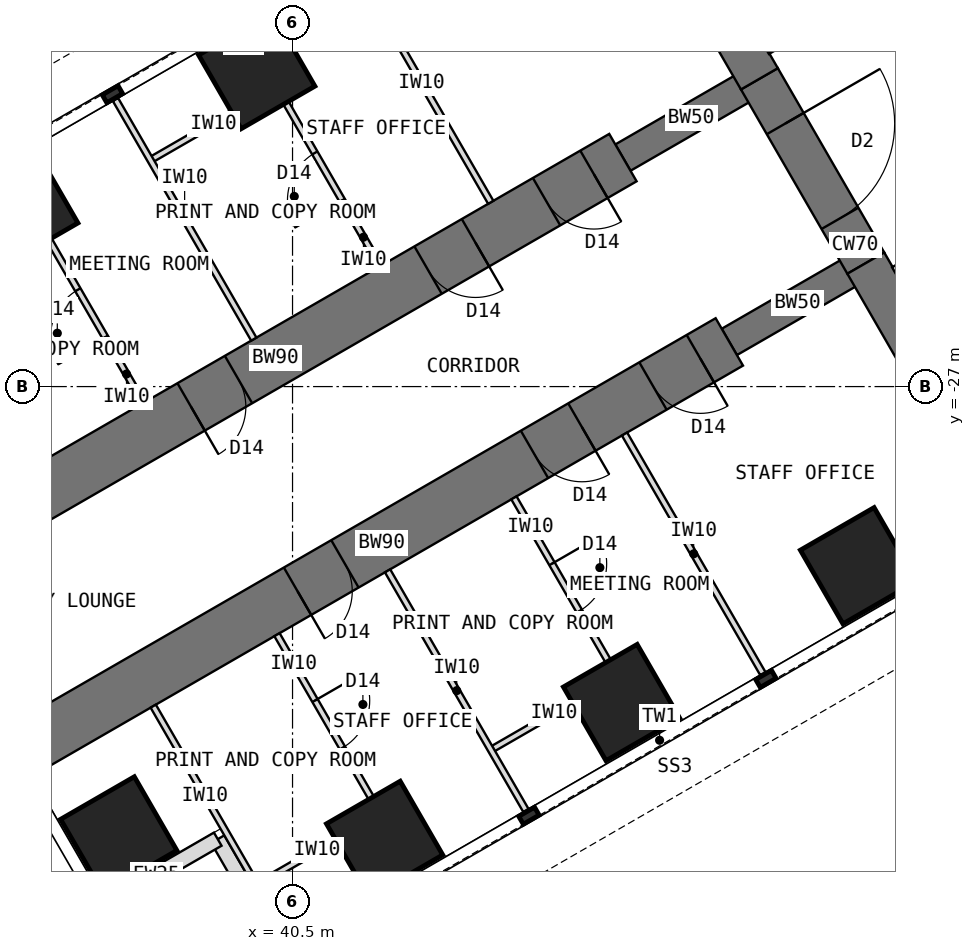
"""IFC4 building model, lengths in metres.
Left out: names, types, materials, properties, quantities, classifications, styles, units other than length and angle.
Written with IfcOpenShell. Run it as: python <this file> out.ifc"""

import sys

from ifc_helpers import new_model, si_unit, direction, frame, frame_2d, origin, origin_2d, place, context, subcontext, project, spatial, rectangle, extrude, element, fill, save


model = new_model("IFC4")
c1 = context("Model", 3, precision=1e-05, world=origin(), true_north=direction((0.0, 1.0)))
c2 = subcontext(c1, "Body", "Model", "MODEL_VIEW")
j1 = project(units=[si_unit("LENGTHUNIT", "METRE"), si_unit("PLANEANGLEUNIT", "RADIAN")], contexts=[c1])
p1 = place(None, origin())
s1 = spatial("IfcSite", under=j1, at=p1, CompositionType="ELEMENT")
p2 = place(p1, origin())
s2 = spatial("IfcBuilding", under=s1, at=p2, CompositionType="ELEMENT")
p3 = place(p2, frame((0.0, 0.0, 84.5)))
s3 = spatial("IfcBuildingStorey", under=s2, at=p3, CompositionType="ELEMENT", Elevation=84.5)
p4 = place(p3, frame((45.904, -18.0, 0.0), z_axis=(0.0, 0.0, 1.0), x_axis=(0.500024481964, -0.866011268655, 0.0)))
e1 = element("IfcWall", 1, at=p4, inside=s3, PredefinedType="SHEAR", context=c2, shape_type="SweptSolid", body=[
    extrude(rectangle(XDim=4.548, YDim=0.7, at=frame_2d((2.274, 0.0))), origin(), (0.0, 0.0, 1.0), 4.0),
])
p5 = place(p3, frame((48.178, -21.939, 0.0), z_axis=(0.0, 0.0, 1.0), x_axis=(0.500010275428, -0.866019471182, 0.0)))
e2 = element("IfcWall", 2, at=p5, inside=s3, PredefinedType="SHEAR", context=c2, shape_type="SweptSolid", body=[
    extrude(rectangle(XDim=3.5, YDim=0.7, at=frame_2d((1.75, 0.0))), origin(), (0.0, 0.0, 1.0), 4.0),
])
p6 = place(p5, frame((0.85, 0.0, 0.0)))
e3 = element("IfcOpeningElement", 3, at=p6, cuts=e2, PredefinedType="OPENING", context=c2, shape_type="SweptSolid", body=[
    extrude(rectangle(XDim=1.8, YDim=2.1, at=frame_2d((0.9, 1.05))), frame((0.0, 0.36, 0.0), z_axis=(0.0, -1.0, 0.0), x_axis=(1.0, 0.0, 0.0)), (0.0, 0.0, 1.0), 0.72),
])
p7 = place(p3, frame((49.928, -24.97, 0.0), z_axis=(0.0, 0.0, 1.0), x_axis=(0.499984222037, -0.866034513004, 0.0)))
e4 = element("IfcWall", 4, at=p7, inside=s3, PredefinedType="SHEAR", context=c2, shape_type="SweptSolid", body=[
    extrude(rectangle(XDim=4.548, YDim=0.7, at=frame_2d((2.274, 0.0))), origin(), (0.0, 0.0, 1.0), 4.0),
])
p8 = place(p3, frame((49.928, -24.97, 0.0), z_axis=(0.0, 0.0, 1.0), x_axis=(-0.866031863473, -0.499988811324, 0.0)))
e5 = element("IfcWall", 5, at=p8, inside=s3, PredefinedType="SHEAR", context=c2, shape_type="SweptSolid", body=[
    extrude(rectangle(XDim=2.592, YDim=0.5, at=frame_2d((1.296, 0.0))), origin(), (0.0, 0.0, 1.0), 4.0),
])
p9 = place(p3, frame((47.684, -26.266, 0.0), z_axis=(0.0, 0.0, 1.0), x_axis=(-0.866027579429, -0.499996231654, 0.0)))
e6 = element("IfcWall", 6, at=p9, inside=s3, PredefinedType="SHEAR", context=c2, shape_type="SweptSolid", body=[
    extrude(rectangle(XDim=13.2, YDim=0.9, at=frame_2d((6.6, 0.0))), origin(), (0.0, 0.0, 1.0), 4.0),
])
p10 = place(p9, frame((0.55, 0.0, 0.0)))
e7 = element("IfcOpeningElement", 7, at=p10, cuts=e6, PredefinedType="OPENING", context=c2, shape_type="SweptSolid", body=[
    extrude(rectangle(XDim=0.9, YDim=2.1, at=frame_2d((0.45, 1.05))), frame((0.0, 0.46, 0.0), z_axis=(0.0, -1.0, 0.0), x_axis=(1.0, 0.0, 0.0)), (0.0, 0.0, 1.0), 0.92),
])
p11 = place(p9, frame((2.8, 0.0, 0.0)))
e8 = element("IfcOpeningElement", 8, at=p11, cuts=e6, PredefinedType="OPENING", context=c2, shape_type="SweptSolid", body=[
    extrude(rectangle(XDim=0.9, YDim=2.1, at=frame_2d((0.45, 1.05))), frame((0.0, 0.46, 0.0), z_axis=(0.0, -1.0, 0.0), x_axis=(1.0, 0.0, 0.0)), (0.0, 0.0, 1.0), 0.92),
])
p12 = place(p9, frame((7.3, 0.0, 0.0)))
e9 = element("IfcOpeningElement", 9, at=p12, cuts=e6, PredefinedType="OPENING", context=c2, shape_type="SweptSolid", body=[
    extrude(rectangle(XDim=0.9, YDim=2.1, at=frame_2d((0.45, 1.05))), frame((0.0, 0.46, 0.0), z_axis=(0.0, -1.0, 0.0), x_axis=(1.0, 0.0, 0.0)), (0.0, 0.0, 1.0), 0.92),
])
p13 = place(p3, frame((48.178, -21.939, 0.0), z_axis=(0.0, 0.0, 1.0), x_axis=(-0.866072649678, -0.499918158782, 0.0)))
e10 = element("IfcWall", 10, at=p13, inside=s3, PredefinedType="SHEAR", context=c2, shape_type="SweptSolid", body=[
    extrude(rectangle(XDim=2.592, YDim=0.5, at=frame_2d((1.296, 0.0))), origin(), (0.0, 0.0, 1.0), 4.0),
])
p14 = place(p3, frame((45.934, -23.234, 0.0), z_axis=(0.0, 0.0, 1.0), x_axis=(-0.866019570528, -0.500010103361, 0.0)))
e11 = element("IfcWall", 11, at=p14, inside=s3, PredefinedType="SHEAR", context=c2, shape_type="SweptSolid", body=[
    extrude(rectangle(XDim=13.2, YDim=0.9, at=frame_2d((6.6, 0.0))), origin(), (0.0, 0.0, 1.0), 4.0),
])
p15 = place(p14, frame((0.55, 0.0, 0.0)))
e12 = element("IfcOpeningElement", 12, at=p15, cuts=e11, PredefinedType="OPENING", context=c2, shape_type="SweptSolid", body=[
    extrude(rectangle(XDim=0.9, YDim=2.1, at=frame_2d((0.45, 1.05))), frame((0.0, 0.46, 0.0), z_axis=(0.0, -1.0, 0.0), x_axis=(1.0, 0.0, 0.0)), (0.0, 0.0, 1.0), 0.92),
])
p16 = place(p14, frame((2.8, 0.0, 0.0)))
e13 = element("IfcOpeningElement", 13, at=p16, cuts=e11, PredefinedType="OPENING", context=c2, shape_type="SweptSolid", body=[
    extrude(rectangle(XDim=0.9, YDim=2.1, at=frame_2d((0.45, 1.05))), frame((0.0, 0.46, 0.0), z_axis=(0.0, -1.0, 0.0), x_axis=(1.0, 0.0, 0.0)), (0.0, 0.0, 1.0), 0.92),
])
p17 = place(p14, frame((7.3, 0.0, 0.0)))
e14 = element("IfcOpeningElement", 14, at=p17, cuts=e11, PredefinedType="OPENING", context=c2, shape_type="SweptSolid", body=[
    extrude(rectangle(XDim=0.9, YDim=2.1, at=frame_2d((0.45, 1.05))), frame((0.0, 0.46, 0.0), z_axis=(0.0, -1.0, 0.0), x_axis=(1.0, 0.0, 0.0)), (0.0, 0.0, 1.0), 0.92),
])
for number, where, z_axis, x_axis in (
    (15, (49.809, -29.946, 0.0), (0.0, 0.0, 1.0), (0.866, 0.5, 0.0)),
    (16, (45.912, -32.196, 0.0), (0.0, 0.0, 1.0), (0.866, 0.5, 0.0)),
    (17, (39.912, -21.804, 0.0), (0.0, 0.0, 1.0), (0.866, 0.5, 0.0)),
    (18, (42.014, -34.446, 0.0), (0.0, 0.0, 1.0), (0.866, 0.5, 0.0)),
    (19, (36.014, -24.054, 0.0), (0.0, 0.0, 1.0), (0.866, 0.5, 0.0)),
    (20, (37.642, -34.373, 0.0), (0.0, 0.0, 1.0), (0.866, 0.5, 0.0)),
):
    element("IfcColumn", number, at=place(p3, frame(where, z_axis=z_axis, x_axis=x_axis)), inside=s3, PredefinedType="COLUMN", context=c2, shape_type="SweptSolid", body=[
        extrude(rectangle(XDim=1.4, YDim=1.4, at=origin_2d()), origin(), (0.0, 0.0, 1.0), 4.0),
    ])
for number, where, z_axis, x_axis in (
    (21, (40.433, -36.456, 0.0), (0.0, 0.0, 1.0), (-0.5, 0.866, 0.0)),
    (22, (39.27, -34.443, 0.0), (0.0, 0.0, 1.0), (-0.866, -0.5, 0.0)),
):
    element("IfcWall", number, at=place(p3, frame(where, z_axis=z_axis, x_axis=x_axis)), inside=s3, PredefinedType="STANDARD", context=c2, shape_type="SweptSolid", body=[
        extrude(rectangle(XDim=2.325, YDim=0.25, at=frame_2d((1.163, 0.0))), origin(), (0.0, 0.0, 1.0), 3.8),
    ])
for number, where, z_axis, x_axis in (
    (23, (45.96, -27.78, 0.0), (0.0, 0.0, 1.0), (0.5, -0.866, 0.0)),
    (24, (42.063, -30.03, 0.0), (0.0, 0.0, 1.0), (0.5, -0.866, 0.0)),
):
    element("IfcWall", number, at=place(p3, frame(where, z_axis=z_axis, x_axis=x_axis)), inside=s3, PredefinedType="PARTITIONING", context=c2, shape_type="SweptSolid", body=[
        extrude(rectangle(XDim=4.55, YDim=0.1, at=frame_2d((2.275, 0.0))), origin(), (0.0, 0.0, 1.0), 3.8),
    ])
p18 = place(p3, frame((45.842, -31.775, 0.0), z_axis=(0.0, 0.0, 1.0), x_axis=(-0.866006032174, -0.500033551112, 0.0)))
e25 = element("IfcWall", 25, at=p18, inside=s3, PredefinedType="PARTITIONING", context=c2, shape_type="SweptSolid", body=[
    extrude(rectangle(XDim=2.4, YDim=0.1, at=frame_2d((1.2, 0.0))), origin(), (0.0, 0.0, 1.0), 3.8),
])
p19 = place(p3, frame((44.141, -28.83, 0.0), z_axis=(0.0, 0.0, 1.0), x_axis=(0.500062241894, -0.865989465428, 0.0)))
e26 = element("IfcWall", 26, at=p19, inside=s3, PredefinedType="PARTITIONING", context=c2, shape_type="SweptSolid", body=[
    extrude(rectangle(XDim=3.4, YDim=0.1, at=frame_2d((1.7, 0.0))), origin(), (0.0, 0.0, 1.0), 3.8),
])
p20 = place(p19, frame((1.25, 0.0, 0.0)))
e27 = element("IfcOpeningElement", 27, at=p20, cuts=e26, PredefinedType="OPENING", context=c2, shape_type="SweptSolid", body=[
    extrude(rectangle(XDim=0.9, YDim=2.1, at=frame_2d((0.45, 1.05))), frame((0.0, 0.06, 0.0), z_axis=(0.0, -1.0, 0.0), x_axis=(1.0, 0.0, 0.0)), (0.0, 0.0, 1.0), 0.12),
])
p21 = place(p3, frame((41.944, -34.025, 0.0), z_axis=(0.0, 0.0, 1.0), x_axis=(-0.865980596518, -0.500077600433, 0.0)))
e28 = element("IfcWall", 28, at=p21, inside=s3, PredefinedType="PARTITIONING", context=c2, shape_type="SweptSolid", body=[
    extrude(rectangle(XDim=2.4, YDim=0.1, at=frame_2d((1.2, 0.0))), origin(), (0.0, 0.0, 1.0), 3.8),
])
p22 = place(p3, frame((40.244, -31.08, 0.0), z_axis=(0.0, 0.0, 1.0), x_axis=(0.500008388397, -0.866020560687, 0.0)))
e29 = element("IfcWall", 29, at=p22, inside=s3, PredefinedType="PARTITIONING", context=c2, shape_type="SweptSolid", body=[
    extrude(rectangle(XDim=3.4, YDim=0.1, at=frame_2d((1.7, 0.0))), origin(), (0.0, 0.0, 1.0), 3.8),
])
p23 = place(p22, frame((1.25, 0.0, 0.0)))
e30 = element("IfcOpeningElement", 30, at=p23, cuts=e29, PredefinedType="OPENING", context=c2, shape_type="SweptSolid", body=[
    extrude(rectangle(XDim=0.9, YDim=2.1, at=frame_2d((0.45, 1.05))), frame((0.0, 0.06, 0.0), z_axis=(0.0, -1.0, 0.0), x_axis=(1.0, 0.0, 0.0)), (0.0, 0.0, 1.0), 0.12),
])
p24 = place(p3, frame((38.209, -32.255, 0.0), z_axis=(0.0, 0.0, 1.0), x_axis=(0.500008388397, -0.866020560687, 0.0)))
e31 = element("IfcWall", 31, at=p24, inside=s3, PredefinedType="PARTITIONING", context=c2, shape_type="SweptSolid", body=[
    extrude(rectangle(XDim=3.4, YDim=0.1, at=frame_2d((1.7, 0.0))), origin(), (0.0, 0.0, 1.0), 3.8),
])
for number, where, z_axis, x_axis in (
    (32, (43.76, -23.97, 0.0), (0.0, 0.0, 1.0), (-0.5, 0.866, 0.0)),
    (33, (39.863, -26.22, 0.0), (0.0, 0.0, 1.0), (-0.5, 0.866, 0.0)),
):
    element("IfcWall", number, at=place(p3, frame(where, z_axis=z_axis, x_axis=x_axis)), inside=s3, PredefinedType="PARTITIONING", context=c2, shape_type="SweptSolid", body=[
        extrude(rectangle(XDim=4.55, YDim=0.1, at=frame_2d((2.275, 0.0))), origin(), (0.0, 0.0, 1.0), 3.8),
    ])
p25 = place(p3, frame((40.241, -22.075, 0.0), z_axis=(0.0, 0.0, 1.0), x_axis=(-0.866024647952, -0.500001309137, 0.0)))
e34 = element("IfcWall", 34, at=p25, inside=s3, PredefinedType="PARTITIONING", context=c2, shape_type="SweptSolid", body=[
    extrude(rectangle(XDim=2.4, YDim=0.1, at=frame_2d((1.2, 0.0))), origin(), (0.0, 0.0, 1.0), 3.8),
])
p26 = place(p3, frame((41.941, -25.02, 0.0), z_axis=(0.0, 0.0, 1.0), x_axis=(-0.499977295307, 0.866038511948, 0.0)))
e35 = element("IfcWall", 35, at=p26, inside=s3, PredefinedType="PARTITIONING", context=c2, shape_type="SweptSolid", body=[
    extrude(rectangle(XDim=3.4, YDim=0.1, at=frame_2d((1.7, 0.0))), origin(), (0.0, 0.0, 1.0), 3.8),
])
p27 = place(p26, frame((1.25, 0.0, 0.0)))
e36 = element("IfcOpeningElement", 36, at=p27, cuts=e35, PredefinedType="OPENING", context=c2, shape_type="SweptSolid", body=[
    extrude(rectangle(XDim=0.9, YDim=2.1, at=frame_2d((0.45, 1.05))), frame((0.0, 0.06, 0.0), z_axis=(0.0, -1.0, 0.0), x_axis=(1.0, 0.0, 0.0)), (0.0, 0.0, 1.0), 0.12),
])
p28 = place(p3, frame((38.044, -27.27, 0.0), z_axis=(0.0, 0.0, 1.0), x_axis=(-0.500031147688, 0.866007419912, 0.0)))
e37 = element("IfcWall", 37, at=p28, inside=s3, PredefinedType="PARTITIONING", context=c2, shape_type="SweptSolid", body=[
    extrude(rectangle(XDim=3.4, YDim=0.1, at=frame_2d((1.7, 0.0))), origin(), (0.0, 0.0, 1.0), 3.8),
])
p29 = place(p28, frame((1.25, 0.0, 0.0)))
e38 = element("IfcOpeningElement", 38, at=p29, cuts=e37, PredefinedType="OPENING", context=c2, shape_type="SweptSolid", body=[
    extrude(rectangle(XDim=0.9, YDim=2.1, at=frame_2d((0.45, 1.05))), frame((0.0, 0.06, 0.0), z_axis=(0.0, -1.0, 0.0), x_axis=(1.0, 0.0, 0.0)), (0.0, 0.0, 1.0), 0.12),
])
p30 = place(p3, frame((48.298, -21.466, 0.0), z_axis=(0.0, 0.0, 1.0), x_axis=(0.866021148949, 0.500007369519, 0.0)))
e39 = element("IfcWall", 39, at=p30, inside=s3, PredefinedType="PARTITIONING", context=c2, shape_type="SweptSolid", body=[
    extrude(rectangle(XDim=4.426, YDim=0.15, at=frame_2d((2.213, 0.0))), origin(), (0.0, 0.0, 1.0), 3.8),
])
p31 = place(p30, frame((2.598, 0.0, 0.0)))
e40 = element("IfcOpeningElement", 40, at=p31, cuts=e39, PredefinedType="OPENING", context=c2, shape_type="SweptSolid", body=[
    extrude(rectangle(XDim=1.0, YDim=2.1, at=frame_2d((0.5, 1.05))), frame((0.0, 0.085, 0.0), z_axis=(0.0, -1.0, 0.0), x_axis=(1.0, 0.0, 0.0)), (0.0, 0.0, 1.0), 0.17),
])
p32 = place(p3, frame((54.23, -22.89, 0.0), z_axis=(0.0, 0.0, 1.0), x_axis=(-0.866021148949, -0.500007369519, 0.0)))
e41 = element("IfcWall", 41, at=p32, inside=s3, PredefinedType="PARTITIONING", context=c2, shape_type="SweptSolid", body=[
    extrude(rectangle(XDim=4.426, YDim=0.15, at=frame_2d((2.213, 0.0))), origin(), (0.0, 0.0, 1.0), 3.8),
])
p33 = place(p32, frame((0.828, 0.0, 0.0)))
e42 = element("IfcOpeningElement", 42, at=p33, cuts=e41, PredefinedType="OPENING", context=c2, shape_type="SweptSolid", body=[
    extrude(rectangle(XDim=1.0, YDim=2.1, at=frame_2d((0.5, 1.05))), frame((0.0, 0.085, 0.0), z_axis=(0.0, -1.0, 0.0), x_axis=(1.0, 0.0, 0.0)), (0.0, 0.0, 1.0), 0.17),
])
p34 = place(p6, origin())
e43 = element("IfcDoor", 43, at=p34, inside=s3, OperationType="DOUBLE_DOOR_DOUBLE_SWING", PredefinedType="DOOR", context=c2, shape_type="SweptSolid", body=[
    extrude(rectangle(XDim=1.72, YDim=2.06, at=frame_2d((0.9, 1.03))), frame((0.0, 0.025, 0.0), z_axis=(0.0, -1.0, 0.0), x_axis=(1.0, 0.0, 0.0)), (0.0, 0.0, 1.0), 0.05),
    extrude(rectangle(XDim=0.04, YDim=2.1, at=frame_2d((0.02, 1.05))), frame((0.0, 0.35, 0.0), z_axis=(0.0, -1.0, 0.0), x_axis=(1.0, 0.0, 0.0)), (0.0, 0.0, 1.0), 0.699),
    extrude(rectangle(XDim=0.04, YDim=2.1, at=frame_2d((1.78, 1.05))), frame((0.0, 0.35, 0.0), z_axis=(0.0, -1.0, 0.0), x_axis=(1.0, 0.0, 0.0)), (0.0, 0.0, 1.0), 0.699),
    extrude(rectangle(XDim=1.72, YDim=0.04, at=frame_2d((0.9, 2.08))), frame((0.0, 0.35, 0.0), z_axis=(0.0, -1.0, 0.0), x_axis=(1.0, 0.0, 0.0)), (0.0, 0.0, 1.0), 0.699),
])
fill(e3, e43)
p35 = place(p20, origin())
e44 = element("IfcDoor", 44, at=p35, inside=s3, OperationType="SINGLE_SWING_LEFT", PredefinedType="DOOR", context=c2, shape_type="SweptSolid", body=[
    extrude(rectangle(XDim=0.9, YDim=2.1, at=frame_2d((0.45, 1.05))), frame((0.0, 0.025, 0.0), z_axis=(0.0, -1.0, 0.0), x_axis=(1.0, 0.0, 0.0)), (0.0, 0.0, 1.0), 0.05),
])
fill(e27, e44)
p36 = place(p23, origin())
e45 = element("IfcDoor", 45, at=p36, inside=s3, OperationType="SINGLE_SWING_LEFT", PredefinedType="DOOR", context=c2, shape_type="SweptSolid", body=[
    extrude(rectangle(XDim=0.9, YDim=2.1, at=frame_2d((0.45, 1.05))), frame((0.0, 0.025, 0.0), z_axis=(0.0, -1.0, 0.0), x_axis=(1.0, 0.0, 0.0)), (0.0, 0.0, 1.0), 0.05),
])
fill(e30, e45)
p37 = place(p27, origin())
e46 = element("IfcDoor", 46, at=p37, inside=s3, OperationType="SINGLE_SWING_LEFT", PredefinedType="DOOR", context=c2, shape_type="SweptSolid", body=[
    extrude(rectangle(XDim=0.9, YDim=2.1, at=frame_2d((0.45, 1.05))), frame((0.0, 0.025, 0.0), z_axis=(0.0, -1.0, 0.0), x_axis=(1.0, 0.0, 0.0)), (0.0, 0.0, 1.0), 0.05),
])
fill(e36, e46)
p38 = place(p29, origin())
e47 = element("IfcDoor", 47, at=p38, inside=s3, OperationType="SINGLE_SWING_LEFT", PredefinedType="DOOR", context=c2, shape_type="SweptSolid", body=[
    extrude(rectangle(XDim=0.9, YDim=2.1, at=frame_2d((0.45, 1.05))), frame((0.0, 0.025, 0.0), z_axis=(0.0, -1.0, 0.0), x_axis=(1.0, 0.0, 0.0)), (0.0, 0.0, 1.0), 0.05),
])
fill(e38, e47)
p39 = place(p10, origin())
e48 = element("IfcDoor", 48, at=p39, inside=s3, OperationType="SINGLE_SWING_LEFT", PredefinedType="DOOR", context=c2, shape_type="SweptSolid", body=[
    extrude(rectangle(XDim=0.82, YDim=2.06, at=frame_2d((0.45, 1.03))), frame((0.0, 0.025, 0.0), z_axis=(0.0, -1.0, 0.0), x_axis=(1.0, 0.0, 0.0)), (0.0, 0.0, 1.0), 0.05),
    extrude(rectangle(XDim=0.04, YDim=2.1, at=frame_2d((0.02, 1.05))), frame((0.0, 0.45, 0.0), z_axis=(0.0, -1.0, 0.0), x_axis=(1.0, 0.0, 0.0)), (0.0, 0.0, 1.0), 0.899),
    extrude(rectangle(XDim=0.04, YDim=2.1, at=frame_2d((0.88, 1.05))), frame((0.0, 0.45, 0.0), z_axis=(0.0, -1.0, 0.0), x_axis=(1.0, 0.0, 0.0)), (0.0, 0.0, 1.0), 0.899),
    extrude(rectangle(XDim=0.82, YDim=0.04, at=frame_2d((0.45, 2.08))), frame((0.0, 0.45, 0.0), z_axis=(0.0, -1.0, 0.0), x_axis=(1.0, 0.0, 0.0)), (0.0, 0.0, 1.0), 0.899),
])
fill(e7, e48)
p40 = place(p11, origin())
e49 = element("IfcDoor", 49, at=p40, inside=s3, OperationType="SINGLE_SWING_LEFT", PredefinedType="DOOR", context=c2, shape_type="SweptSolid", body=[
    extrude(rectangle(XDim=0.82, YDim=2.06, at=frame_2d((0.45, 1.03))), frame((0.0, 0.025, 0.0), z_axis=(0.0, -1.0, 0.0), x_axis=(1.0, 0.0, 0.0)), (0.0, 0.0, 1.0), 0.05),
    extrude(rectangle(XDim=0.04, YDim=2.1, at=frame_2d((0.02, 1.05))), frame((0.0, 0.45, 0.0), z_axis=(0.0, -1.0, 0.0), x_axis=(1.0, 0.0, 0.0)), (0.0, 0.0, 1.0), 0.899),
    extrude(rectangle(XDim=0.04, YDim=2.1, at=frame_2d((0.88, 1.05))), frame((0.0, 0.45, 0.0), z_axis=(0.0, -1.0, 0.0), x_axis=(1.0, 0.0, 0.0)), (0.0, 0.0, 1.0), 0.899),
    extrude(rectangle(XDim=0.82, YDim=0.04, at=frame_2d((0.45, 2.08))), frame((0.0, 0.45, 0.0), z_axis=(0.0, -1.0, 0.0), x_axis=(1.0, 0.0, 0.0)), (0.0, 0.0, 1.0), 0.899),
])
fill(e8, e49)
p41 = place(p12, origin())
e50 = element("IfcDoor", 50, at=p41, inside=s3, OperationType="SINGLE_SWING_RIGHT", PredefinedType="DOOR", context=c2, shape_type="SweptSolid", body=[
    extrude(rectangle(XDim=0.82, YDim=2.06, at=frame_2d((0.45, 1.03))), frame((0.0, 0.025, 0.0), z_axis=(0.0, -1.0, 0.0), x_axis=(1.0, 0.0, 0.0)), (0.0, 0.0, 1.0), 0.05),
    extrude(rectangle(XDim=0.04, YDim=2.1, at=frame_2d((0.02, 1.05))), frame((0.0, 0.45, 0.0), z_axis=(0.0, -1.0, 0.0), x_axis=(1.0, 0.0, 0.0)), (0.0, 0.0, 1.0), 0.899),
    extrude(rectangle(XDim=0.04, YDim=2.1, at=frame_2d((0.88, 1.05))), frame((0.0, 0.45, 0.0), z_axis=(0.0, -1.0, 0.0), x_axis=(1.0, 0.0, 0.0)), (0.0, 0.0, 1.0), 0.899),
    extrude(rectangle(XDim=0.82, YDim=0.04, at=frame_2d((0.45, 2.08))), frame((0.0, 0.45, 0.0), z_axis=(0.0, -1.0, 0.0), x_axis=(1.0, 0.0, 0.0)), (0.0, 0.0, 1.0), 0.899),
])
fill(e9, e50)
p42 = place(p15, origin())
e51 = element("IfcDoor", 51, at=p42, inside=s3, OperationType="SINGLE_SWING_LEFT", PredefinedType="DOOR", context=c2, shape_type="SweptSolid", body=[
    extrude(rectangle(XDim=0.82, YDim=2.06, at=frame_2d((0.45, 1.03))), frame((0.0, 0.025, 0.0), z_axis=(0.0, -1.0, 0.0), x_axis=(1.0, 0.0, 0.0)), (0.0, 0.0, 1.0), 0.05),
    extrude(rectangle(XDim=0.04, YDim=2.1, at=frame_2d((0.02, 1.05))), frame((0.0, 0.45, 0.0), z_axis=(0.0, -1.0, 0.0), x_axis=(1.0, 0.0, 0.0)), (0.0, 0.0, 1.0), 0.899),
    extrude(rectangle(XDim=0.04, YDim=2.1, at=frame_2d((0.88, 1.05))), frame((0.0, 0.45, 0.0), z_axis=(0.0, -1.0, 0.0), x_axis=(1.0, 0.0, 0.0)), (0.0, 0.0, 1.0), 0.899),
    extrude(rectangle(XDim=0.82, YDim=0.04, at=frame_2d((0.45, 2.08))), frame((0.0, 0.45, 0.0), z_axis=(0.0, -1.0, 0.0), x_axis=(1.0, 0.0, 0.0)), (0.0, 0.0, 1.0), 0.899),
])
fill(e12, e51)
p43 = place(p16, origin())
e52 = element("IfcDoor", 52, at=p43, inside=s3, OperationType="SINGLE_SWING_LEFT", PredefinedType="DOOR", context=c2, shape_type="SweptSolid", body=[
    extrude(rectangle(XDim=0.82, YDim=2.06, at=frame_2d((0.45, 1.03))), frame((0.0, 0.025, 0.0), z_axis=(0.0, -1.0, 0.0), x_axis=(1.0, 0.0, 0.0)), (0.0, 0.0, 1.0), 0.05),
    extrude(rectangle(XDim=0.04, YDim=2.1, at=frame_2d((0.02, 1.05))), frame((0.0, 0.45, 0.0), z_axis=(0.0, -1.0, 0.0), x_axis=(1.0, 0.0, 0.0)), (0.0, 0.0, 1.0), 0.899),
    extrude(rectangle(XDim=0.04, YDim=2.1, at=frame_2d((0.88, 1.05))), frame((0.0, 0.45, 0.0), z_axis=(0.0, -1.0, 0.0), x_axis=(1.0, 0.0, 0.0)), (0.0, 0.0, 1.0), 0.899),
    extrude(rectangle(XDim=0.82, YDim=0.04, at=frame_2d((0.45, 2.08))), frame((0.0, 0.45, 0.0), z_axis=(0.0, -1.0, 0.0), x_axis=(1.0, 0.0, 0.0)), (0.0, 0.0, 1.0), 0.899),
])
fill(e13, e52)
p44 = place(p17, origin())
e53 = element("IfcDoor", 53, at=p44, inside=s3, OperationType="SINGLE_SWING_RIGHT", PredefinedType="DOOR", context=c2, shape_type="SweptSolid", body=[
    extrude(rectangle(XDim=0.82, YDim=2.06, at=frame_2d((0.45, 1.03))), frame((0.0, 0.025, 0.0), z_axis=(0.0, -1.0, 0.0), x_axis=(1.0, 0.0, 0.0)), (0.0, 0.0, 1.0), 0.05),
    extrude(rectangle(XDim=0.04, YDim=2.1, at=frame_2d((0.02, 1.05))), frame((0.0, 0.45, 0.0), z_axis=(0.0, -1.0, 0.0), x_axis=(1.0, 0.0, 0.0)), (0.0, 0.0, 1.0), 0.899),
    extrude(rectangle(XDim=0.04, YDim=2.1, at=frame_2d((0.88, 1.05))), frame((0.0, 0.45, 0.0), z_axis=(0.0, -1.0, 0.0), x_axis=(1.0, 0.0, 0.0)), (0.0, 0.0, 1.0), 0.899),
    extrude(rectangle(XDim=0.82, YDim=0.04, at=frame_2d((0.45, 2.08))), frame((0.0, 0.45, 0.0), z_axis=(0.0, -1.0, 0.0), x_axis=(1.0, 0.0, 0.0)), (0.0, 0.0, 1.0), 0.899),
])
fill(e14, e53)
save(model, sys.argv[1])
